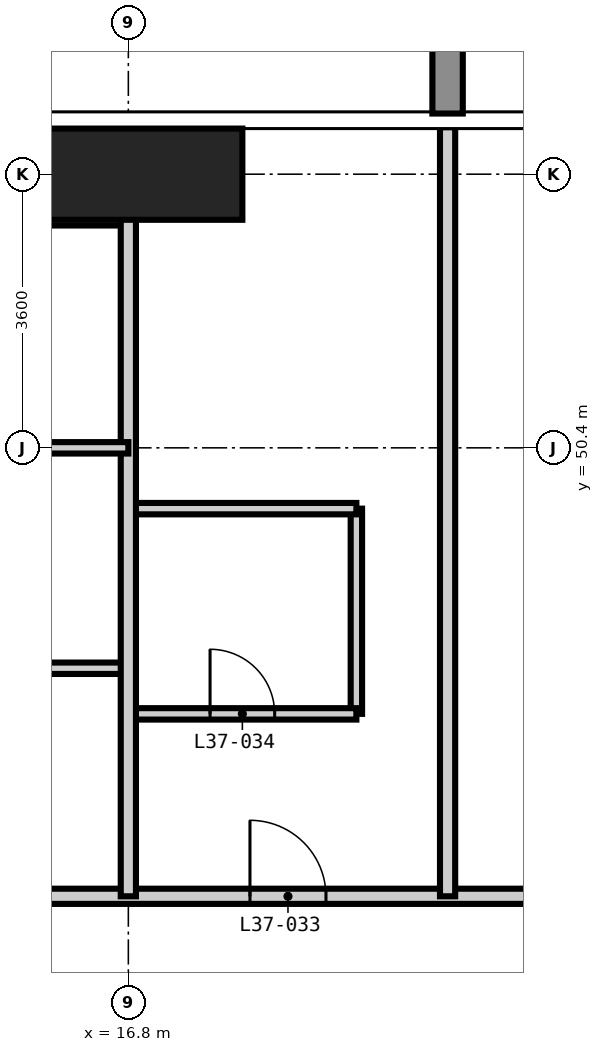
"""IFC4 building model, lengths in metres.
Left out: names, types, materials, properties, quantities, classifications, styles, units other than length and angle.
Written with IfcOpenShell. Run it as: python <this file> out.ifc"""

import sys

from ifc_helpers import new_model, si_unit, direction, frame, frame_2d, origin, origin_2d, place, context, subcontext, project, spatial, rectangle, extrude, element, fill, save


model = new_model("IFC4")
c1 = context("Model", 3, precision=1e-05, world=origin(), true_north=direction((0.0, 1.0)))
c2 = subcontext(c1, "Body", "Model", "MODEL_VIEW")
j1 = project(units=[si_unit("LENGTHUNIT", "METRE"), si_unit("PLANEANGLEUNIT", "RADIAN")], contexts=[c1])
p1 = place(None, origin())
s1 = spatial("IfcSite", under=j1, at=p1, CompositionType="ELEMENT")
p2 = place(p1, origin())
s2 = spatial("IfcBuilding", under=s1, at=p2, CompositionType="ELEMENT")
p3 = place(p2, frame((0.0, 0.0, 144.0)))
s3 = spatial("IfcBuildingStorey", under=s2, at=p3, CompositionType="ELEMENT", Elevation=144.0)
p4 = place(p3, frame((16.8, 54.0, -0.35), z_axis=(0.0, 0.0, 1.0), x_axis=(1.0, 0.0, 0.0)))
e1 = element("IfcColumn", 1, at=p4, inside=s3, PredefinedType="COLUMN", context=c2, shape_type="SweptSolid", body=[
    extrude(rectangle(XDim=3.0, YDim=1.2, at=origin_2d()), origin(), (0.0, 0.0, 1.0), 3.6),
])
p5 = place(p3, frame((19.8, 46.9, 0.0), z_axis=(0.0, 0.0, 1.0), x_axis=(0.0, 1.0, 0.0)))
e2 = element("IfcWall", 2, at=p5, inside=s3, PredefinedType="PARTITIONING", context=c2, shape_type="SweptSolid", body=[
    extrude(rectangle(XDim=2.7, YDim=0.15, at=frame_2d((1.35, 0.0))), origin(), (0.0, 0.0, 1.0), 3.25),
])
p6 = place(p3, frame((16.8, 46.9, 0.0), z_axis=(0.0, 0.0, 1.0), x_axis=(1.0, 0.0, 0.0)))
e3 = element("IfcWall", 3, at=p6, inside=s3, PredefinedType="PARTITIONING", context=c2, shape_type="SweptSolid", body=[
    extrude(rectangle(XDim=3.0, YDim=0.15, at=frame_2d((1.5, 0.0))), origin(), (0.0, 0.0, 1.0), 3.25),
])
p7 = place(p6, frame((1.075, 0.0, 0.0)))
e4 = element("IfcOpeningElement", 4, at=p7, cuts=e3, PredefinedType="OPENING", context=c2, shape_type="SweptSolid", body=[
    extrude(rectangle(XDim=0.85, YDim=2.1, at=frame_2d((0.425, 1.05))), frame((0.0, 0.085, 0.0), z_axis=(0.0, -1.0, 0.0), x_axis=(1.0, 0.0, 0.0)), (0.0, 0.0, 1.0), 0.17),
])
p8 = place(p3, frame((12.6, 47.5, 0.0), z_axis=(0.0, 0.0, 1.0), x_axis=(1.0, 0.0, 0.0)))
e5 = element("IfcWall", 5, at=p8, inside=s3, PredefinedType="PARTITIONING", context=c2, shape_type="SweptSolid", body=[
    extrude(rectangle(XDim=4.2, YDim=0.15, at=frame_2d((2.1, 0.0))), origin(), (0.0, 0.0, 1.0), 3.25),
])
p9 = place(p8, frame((1.675, 0.0, 0.0)))
e6 = element("IfcOpeningElement", 6, at=p9, cuts=e5, PredefinedType="OPENING", context=c2, shape_type="SweptSolid", body=[
    extrude(rectangle(XDim=0.85, YDim=2.1, at=frame_2d((0.425, 1.05))), frame((0.0, 0.085, 0.0), z_axis=(0.0, -1.0, 0.0), x_axis=(1.0, 0.0, 0.0)), (0.0, 0.0, 1.0), 0.17),
])
p10 = place(p3, frame((16.8, 49.6, 0.0), z_axis=(0.0, 0.0, 1.0), x_axis=(1.0, 0.0, 0.0)))
e7 = element("IfcWall", 7, at=p10, inside=s3, PredefinedType="PARTITIONING", context=c2, shape_type="SweptSolid", body=[
    extrude(rectangle(XDim=3.0, YDim=0.15, at=frame_2d((1.5, 0.0))), origin(), (0.0, 0.0, 1.0), 3.25),
])
p11 = place(p3, frame((13.2, 53.4, 0.0), z_axis=(0.0, 0.0, 1.0), x_axis=(1.0, 0.0, 0.0)))
e8 = element("IfcWall", 8, at=p11, inside=s3, PredefinedType="PARTITIONING", context=c2, shape_type="SweptSolid", body=[
    extrude(rectangle(XDim=3.6, YDim=0.15, at=frame_2d((1.8, 0.0))), origin(), (0.0, 0.0, 1.0), 3.25),
])
p12 = place(p11, frame((1.175, 0.0, 0.0)))
e9 = element("IfcOpeningElement", 9, at=p12, cuts=e8, PredefinedType="OPENING", context=c2, shape_type="SweptSolid", body=[
    extrude(rectangle(XDim=0.85, YDim=2.1, at=frame_2d((0.425, 1.05))), frame((0.0, 0.085, 0.0), z_axis=(0.0, -1.0, 0.0), x_axis=(1.0, 0.0, 0.0)), (0.0, 0.0, 1.0), 0.17),
])
p13 = place(p3, frame((12.6, 44.5, 0.0), z_axis=(0.0, 0.0, 1.0), x_axis=(1.0, 0.0, 0.0)))
e10 = element("IfcWall", 10, at=p13, inside=s3, PredefinedType="PARTITIONING", context=c2, shape_type="SweptSolid", body=[
    extrude(rectangle(XDim=32.5, YDim=0.2, at=frame_2d((16.25, 0.0))), origin(), (0.0, 0.0, 1.0), 3.25),
])
p14 = place(p13, frame((5.8, 0.0, 0.0)))
e11 = element("IfcOpeningElement", 11, at=p14, cuts=e10, PredefinedType="OPENING", context=c2, shape_type="SweptSolid", body=[
    extrude(rectangle(XDim=1.0, YDim=2.2, at=frame_2d((0.5, 1.1))), frame((0.0, 0.11, 0.0), z_axis=(0.0, -1.0, 0.0), x_axis=(1.0, 0.0, 0.0)), (0.0, 0.0, 1.0), 0.22),
])
p15 = place(p13, frame((12.1, 0.0, 0.0)))
e12 = element("IfcOpeningElement", 12, at=p15, cuts=e10, PredefinedType="OPENING", context=c2, shape_type="SweptSolid", body=[
    extrude(rectangle(XDim=1.0, YDim=2.2, at=frame_2d((0.5, 1.1))), frame((0.0, 0.11, 0.0), z_axis=(0.0, -1.0, 0.0), x_axis=(1.0, 0.0, 0.0)), (0.0, 0.0, 1.0), 0.22),
])
p16 = place(p13, frame((20.5, 0.0, 0.0)))
e13 = element("IfcOpeningElement", 13, at=p16, cuts=e10, PredefinedType="OPENING", context=c2, shape_type="SweptSolid", body=[
    extrude(rectangle(XDim=1.0, YDim=2.2, at=frame_2d((0.5, 1.1))), frame((0.0, 0.11, 0.0), z_axis=(0.0, -1.0, 0.0), x_axis=(1.0, 0.0, 0.0)), (0.0, 0.0, 1.0), 0.22),
])
p17 = place(p13, frame((26.8, 0.0, 0.0)))
e14 = element("IfcOpeningElement", 14, at=p17, cuts=e10, PredefinedType="OPENING", context=c2, shape_type="SweptSolid", body=[
    extrude(rectangle(XDim=1.0, YDim=2.2, at=frame_2d((0.5, 1.1))), frame((0.0, 0.11, 0.0), z_axis=(0.0, -1.0, 0.0), x_axis=(1.0, 0.0, 0.0)), (0.0, 0.0, 1.0), 0.22),
])
for number, where, z_axis, x_axis in (
    (15, (16.8, 44.5, 0.0), (0.0, 0.0, 1.0), (0.0, 1.0, 0.0)),
    (16, (21.0, 44.5, 0.0), (0.0, 0.0, 1.0), (0.0, 1.0, 0.0)),
):
    element("IfcWall", number, at=place(p3, frame(where, z_axis=z_axis, x_axis=x_axis)), inside=s3, PredefinedType="PARTITIONING", context=c2, shape_type="SweptSolid", body=[
        extrude(rectangle(XDim=10.118, YDim=0.2, at=frame_2d((5.059, 0.0))), origin(), (0.0, 0.0, 1.0), 3.25),
    ])
p18 = place(p3, frame((-0.018, 50.4, 0.0), z_axis=(0.0, 0.0, 1.0), x_axis=(1.0, 0.0, 0.0)))
e17 = element("IfcWall", 17, at=p18, inside=s3, PredefinedType="PARTITIONING", context=c2, shape_type="SweptSolid", body=[
    extrude(rectangle(XDim=16.818, YDim=0.15, at=frame_2d((8.409, 0.0))), origin(), (0.0, 0.0, 1.0), 3.25),
])
p19 = place(p18, frame((5.968, 0.0, 0.0)))
e18 = element("IfcOpeningElement", 18, at=p19, cuts=e17, PredefinedType="OPENING", context=c2, shape_type="SweptSolid", body=[
    extrude(rectangle(XDim=0.9, YDim=2.1, at=frame_2d((0.45, 1.05))), frame((0.0, 0.085, 0.0), z_axis=(0.0, -1.0, 0.0), x_axis=(1.0, 0.0, 0.0)), (0.0, 0.0, 1.0), 0.17),
])
p20 = place(p14, origin())
e19 = element("IfcDoor", 19, at=p20, inside=s3, OperationType="SINGLE_SWING_LEFT", PredefinedType="DOOR", context=c2, shape_type="SweptSolid", body=[
    extrude(rectangle(XDim=1.0, YDim=2.2, at=frame_2d((0.5, 1.1))), frame((0.0, 0.025, 0.0), z_axis=(0.0, -1.0, 0.0), x_axis=(1.0, 0.0, 0.0)), (0.0, 0.0, 1.0), 0.05),
])
fill(e11, e19)
p21 = place(p7, origin())
e20 = element("IfcDoor", 20, at=p21, inside=s3, OperationType="SINGLE_SWING_LEFT", PredefinedType="DOOR", context=c2, shape_type="SweptSolid", body=[
    extrude(rectangle(XDim=0.85, YDim=2.1, at=frame_2d((0.425, 1.05))), frame((0.0, 0.025, 0.0), z_axis=(0.0, -1.0, 0.0), x_axis=(1.0, 0.0, 0.0)), (0.0, 0.0, 1.0), 0.05),
])
fill(e4, e20)
save(model, sys.argv[1])
